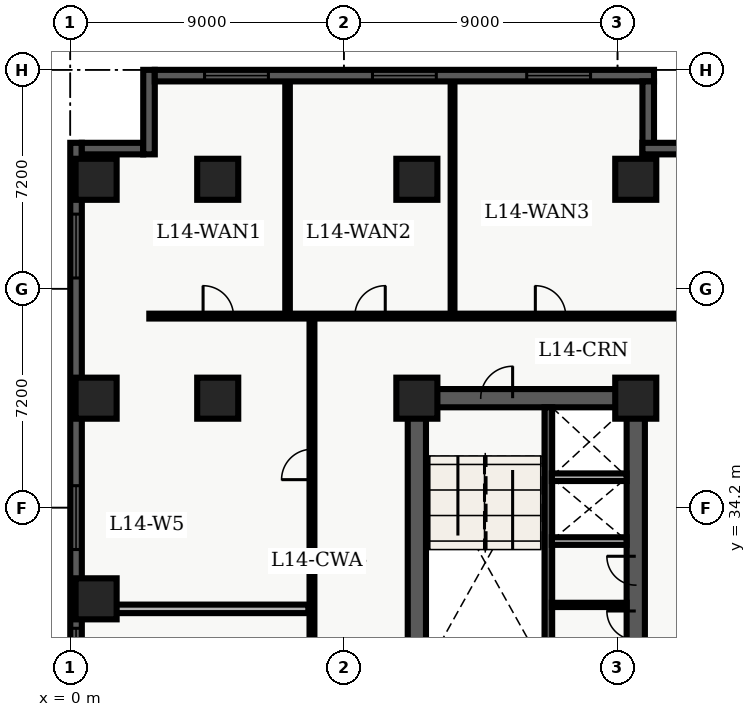
"""IFC4 building model, lengths in metres.
Left out: names, types, materials, properties, quantities, classifications, styles, units other than length and angle.
Written with IfcOpenShell. Run it as: python <this file> out.ifc"""

import sys

from ifc_helpers import new_model, entity, si_unit, converted_unit, direction, frame, origin_with_axes, origin_2d_with_axis, place, context, subcontext, project, spatial, polyline, rectangle, outline, extrude, element, fill, save


model = new_model("IFC4")
c1 = context("Model", 3, precision=1e-05, world=origin_with_axes(), true_north=direction((0.0, 1.0)))
c2 = subcontext(c1, "Body", "Model", "MODEL_VIEW")
j1 = project(units=[si_unit("LENGTHUNIT", "METRE"), converted_unit("PLANEANGLEUNIT", "DEGREE", entity("IfcPlaneAngleMeasure", 0.017), si_unit("PLANEANGLEUNIT", "RADIAN"), dimensions=[0, 0, 0, 0, 0, 0, 0])], contexts=[c1])
p1 = place(None, origin_with_axes())
s1 = spatial("IfcSite", under=j1, at=p1, CompositionType="ELEMENT")
p2 = place(p1, origin_with_axes())
s2 = spatial("IfcBuilding", under=s1, at=p2, CompositionType="ELEMENT")
p3 = place(p2, frame((0.0, 0.0, 60.0), z_axis=(0.0, 0.0, 1.0), x_axis=(1.0, 0.0, 0.0)))
s3 = spatial("IfcBuildingStorey", under=s2, at=p3, CompositionType="ELEMENT", Elevation=60.0)
p4 = place(p3, frame((11.4, 10.8, 0.0), z_axis=(0.0, 0.0, 1.0), x_axis=(0.0, 1.0, 0.0)))
e1 = element("IfcWall", 1, at=p4, inside=s3, PredefinedType="SHEAR", context=c2, shape_type="SweptSolid", body=[
    extrude(outline(polyline([(0.0, -0.3), (27.0, -0.3), (27.0, 0.3), (0.0, 0.3), (0.0, -0.3)])), origin_with_axes(), (0.0, 0.0, 1.0), 3.66),
])
p5 = place(p3, frame((11.4, 37.8, 0.0), z_axis=(0.0, 0.0, 1.0), x_axis=(1.0, 0.0, 0.0)))
e2 = element("IfcWall", 2, at=p5, inside=s3, PredefinedType="SHEAR", context=c2, shape_type="SweptSolid", body=[
    extrude(outline(polyline([(0.0, -0.3), (7.2, -0.3), (7.2, 0.3), (0.0, 0.3), (0.0, -0.3)])), origin_with_axes(), (0.0, 0.0, 1.0), 3.66),
])
p6 = place(p5, frame((2.625, 0.0, 0.0), z_axis=(0.0, 0.0, 1.0), x_axis=(1.0, 0.0, 0.0)))
e3 = element("IfcOpeningElement", 3, at=p6, cuts=e2, PredefinedType="OPENING", context=c2, shape_type="SweptSolid", body=[
    extrude(rectangle(XDim=1.05, YDim=0.62, at=origin_2d_with_axis()), origin_with_axes(), (0.0, 0.0, 1.0), 2.15),
])
p7 = place(p3, frame((18.6, 24.3, 0.0), z_axis=(0.0, 0.0, 1.0), x_axis=(0.0, 1.0, 0.0)))
e4 = element("IfcWall", 4, at=p7, inside=s3, PredefinedType="SHEAR", context=c2, shape_type="SweptSolid", body=[
    extrude(outline(polyline([(0.0, -0.3), (13.5, -0.3), (13.5, 0.3), (0.0, 0.3), (0.0, -0.3)])), origin_with_axes(), (0.0, 0.0, 1.0), 3.66),
])
p8 = place(p7, frame((6.025, 0.0, 0.0), z_axis=(0.0, 0.0, 1.0), x_axis=(1.0, 0.0, 0.0)))
e5 = element("IfcOpeningElement", 5, at=p8, cuts=e4, PredefinedType="OPENING", context=c2, shape_type="SweptSolid", body=[
    extrude(rectangle(XDim=0.95, YDim=0.62, at=origin_2d_with_axis()), origin_with_axes(), (0.0, 0.0, 1.0), 2.15),
])
p9 = place(p7, frame((7.825, 0.0, 0.0), z_axis=(0.0, 0.0, 1.0), x_axis=(1.0, 0.0, 0.0)))
e6 = element("IfcOpeningElement", 6, at=p9, cuts=e4, PredefinedType="OPENING", context=c2, shape_type="SweptSolid", body=[
    extrude(rectangle(XDim=0.95, YDim=0.62, at=origin_2d_with_axis()), origin_with_axes(), (0.0, 0.0, 1.0), 2.15),
])
p10 = place(p3, frame((15.725, 28.9, 0.0), z_axis=(0.0, 0.0, 1.0), x_axis=(0.0, 1.0, 0.0)))
e7 = element("IfcWall", 7, at=p10, inside=s3, PredefinedType="SHEAR", context=c2, shape_type="SweptSolid", body=[
    extrude(outline(polyline([(0.0, -0.125), (8.6, -0.125), (8.6, 0.125), (0.0, 0.125), (0.0, -0.125)])), origin_with_axes(), (0.0, 0.0, 1.0), 3.66),
])
for number, where, z_axis, x_axis in (
    (8, (11.4, 37.8, 0.0), (0.0, 0.0, 1.0), (1.0, 0.0, 0.0)),
    (9, (11.4, 45.0, 0.0), (0.0, 0.0, 1.0), (1.0, 0.0, 0.0)),
    (10, (18.6, 37.8, 0.0), (0.0, 0.0, 1.0), (1.0, 0.0, 0.0)),
    (11, (18.6, 45.0, 0.0), (0.0, 0.0, 1.0), (1.0, 0.0, 0.0)),
    (12, (4.85, 37.8, 0.0), (0.0, 0.0, 1.0), (1.0, 0.0, 0.0)),
    (13, (4.85, 45.0, 0.0), (0.0, 0.0, 1.0), (1.0, 0.0, 0.0)),
    (14, (0.85, 31.2, 0.0), (0.0, 0.0, 1.0), (1.0, 0.0, 0.0)),
    (15, (0.85, 37.8, 0.0), (0.0, 0.0, 1.0), (1.0, 0.0, 0.0)),
    (16, (0.85, 45.0, 0.0), (0.0, 0.0, 1.0), (1.0, 0.0, 0.0)),
):
    element("IfcColumn", number, at=place(p3, frame(where, z_axis=z_axis, x_axis=x_axis)), inside=s3, PredefinedType="COLUMN", context=c2, shape_type="SweptSolid", body=[
        extrude(rectangle(XDim=1.35, YDim=1.35, at=origin_2d_with_axis()), origin_with_axes(), (0.0, 0.0, 1.0), 3.9),
    ])
for number, where, z_axis, x_axis in (
    (17, (15.84, 33.1, 0.0), (0.0, 0.0, 1.0), (1.0, 0.0, 0.0)),
    (18, (15.84, 35.2, 0.0), (0.0, 0.0, 1.0), (1.0, 0.0, 0.0)),
):
    element("IfcWall", number, at=place(p3, frame(where, z_axis=z_axis, x_axis=x_axis)), inside=s3, PredefinedType="SOLIDWALL", context=c2, shape_type="SweptSolid", body=[
        extrude(outline(polyline([(0.0, -0.125), (2.46, -0.125), (2.46, 0.125), (0.0, 0.125), (0.0, -0.125)])), origin_with_axes(), (0.0, 0.0, 1.0), 2.7),
    ])
p11 = place(p3, frame((15.84, 31.0, 0.0), z_axis=(0.0, 0.0, 1.0), x_axis=(1.0, 0.0, 0.0)))
e19 = element("IfcWall", 19, at=p11, inside=s3, PredefinedType="PARTITIONING", context=c2, shape_type="SweptSolid", body=[
    extrude(outline(polyline([(0.0, -0.07), (2.46, -0.07), (2.46, 0.07), (0.0, 0.07), (0.0, -0.07)])), origin_with_axes(), (0.0, 0.0, 1.0), 2.7),
])
p12 = place(p3, frame((2.6, 40.5, 0.0), z_axis=(0.0, 0.0, 1.0), x_axis=(1.0, 0.0, 0.0)))
e20 = element("IfcWall", 20, at=p12, inside=s3, PredefinedType="PARTITIONING", context=c2, shape_type="SweptSolid", body=[
    extrude(outline(polyline([(0.0, -0.08), (18.65, -0.08), (18.65, 0.08), (0.0, 0.08), (0.0, -0.08)])), origin_with_axes(), (0.0, 0.0, 1.0), 2.7),
])
p13 = place(p12, frame((2.268, 0.0, 0.0), z_axis=(0.0, 0.0, 1.0), x_axis=(1.0, 0.0, 0.0)))
e21 = element("IfcOpeningElement", 21, at=p13, cuts=e20, PredefinedType="OPENING", context=c2, shape_type="SweptSolid", body=[
    extrude(rectangle(XDim=1.0, YDim=0.18, at=origin_2d_with_axis()), origin_with_axes(), (0.0, 0.0, 1.0), 2.15),
])
p14 = place(p12, frame((7.261, 0.0, 0.0), z_axis=(0.0, 0.0, 1.0), x_axis=(1.0, 0.0, 0.0)))
e22 = element("IfcOpeningElement", 22, at=p14, cuts=e20, PredefinedType="OPENING", context=c2, shape_type="SweptSolid", body=[
    extrude(rectangle(XDim=1.0, YDim=0.18, at=origin_2d_with_axis()), origin_with_axes(), (0.0, 0.0, 1.0), 2.15),
])
p15 = place(p12, frame((13.197, 0.0, 0.0), z_axis=(0.0, 0.0, 1.0), x_axis=(1.0, 0.0, 0.0)))
e23 = element("IfcOpeningElement", 23, at=p15, cuts=e20, PredefinedType="OPENING", context=c2, shape_type="SweptSolid", body=[
    extrude(rectangle(XDim=1.0, YDim=0.18, at=origin_2d_with_axis()), origin_with_axes(), (0.0, 0.0, 1.0), 2.15),
])
p16 = place(p3, frame((7.95, 7.8, 0.0), z_axis=(0.0, 0.0, 1.0), x_axis=(0.0, 1.0, 0.0)))
e24 = element("IfcWall", 24, at=p16, inside=s3, PredefinedType="PARTITIONING", context=c2, shape_type="SweptSolid", body=[
    extrude(outline(polyline([(0.0, -0.08), (32.7, -0.08), (32.7, 0.08), (0.0, 0.08), (0.0, -0.08)])), origin_with_axes(), (0.0, 0.0, 1.0), 2.7),
])
p17 = place(p16, frame((2.288, 0.0, 0.0), z_axis=(0.0, 0.0, 1.0), x_axis=(1.0, 0.0, 0.0)))
e25 = element("IfcOpeningElement", 25, at=p17, cuts=e24, PredefinedType="OPENING", context=c2, shape_type="SweptSolid", body=[
    extrude(rectangle(XDim=1.0, YDim=0.18, at=origin_2d_with_axis()), origin_with_axes(), (0.0, 0.0, 1.0), 2.15),
])
p18 = place(p16, frame((6.971, 0.0, 0.0), z_axis=(0.0, 0.0, 1.0), x_axis=(1.0, 0.0, 0.0)))
e26 = element("IfcOpeningElement", 26, at=p18, cuts=e24, PredefinedType="OPENING", context=c2, shape_type="SweptSolid", body=[
    extrude(rectangle(XDim=1.0, YDim=0.18, at=origin_2d_with_axis()), origin_with_axes(), (0.0, 0.0, 1.0), 2.15),
])
p19 = place(p16, frame((12.598, 0.0, 0.0), z_axis=(0.0, 0.0, 1.0), x_axis=(1.0, 0.0, 0.0)))
e27 = element("IfcOpeningElement", 27, at=p19, cuts=e24, PredefinedType="OPENING", context=c2, shape_type="SweptSolid", body=[
    extrude(rectangle(XDim=1.0, YDim=0.18, at=origin_2d_with_axis()), origin_with_axes(), (0.0, 0.0, 1.0), 2.15),
])
p20 = place(p16, frame((19.386, 0.0, 0.0), z_axis=(0.0, 0.0, 1.0), x_axis=(1.0, 0.0, 0.0)))
e28 = element("IfcOpeningElement", 28, at=p20, cuts=e24, PredefinedType="OPENING", context=c2, shape_type="SweptSolid", body=[
    extrude(rectangle(XDim=1.0, YDim=0.18, at=origin_2d_with_axis()), origin_with_axes(), (0.0, 0.0, 1.0), 2.15),
])
p21 = place(p16, frame((27.82, 0.0, 0.0), z_axis=(0.0, 0.0, 1.0), x_axis=(1.0, 0.0, 0.0)))
e29 = element("IfcOpeningElement", 29, at=p21, cuts=e24, PredefinedType="OPENING", context=c2, shape_type="SweptSolid", body=[
    extrude(rectangle(XDim=1.0, YDim=0.18, at=origin_2d_with_axis()), origin_with_axes(), (0.0, 0.0, 1.0), 2.15),
])
p22 = place(p3, frame((0.375, 30.87, 0.0), z_axis=(0.0, 0.0, 1.0), x_axis=(1.0, 0.0, 0.0)))
e30 = element("IfcWall", 30, at=p22, inside=s3, PredefinedType="PARTITIONING", context=c2, shape_type="SweptSolid", body=[
    extrude(outline(polyline([(0.0, -0.14), (7.455, -0.14), (7.455, 0.14), (0.0, 0.14), (0.0, -0.14)])), origin_with_axes(), (0.0, 0.0, 1.0), 2.7),
])
p23 = place(p3, frame((7.147, 40.6, 0.0), z_axis=(0.0, 0.0, 1.0), x_axis=(0.0, 1.0, 0.0)))
e31 = element("IfcWall", 31, at=p23, inside=s3, PredefinedType="PARTITIONING", context=c2, shape_type="SweptSolid", body=[
    extrude(outline(polyline([(0.0, -0.075), (7.64, -0.075), (7.64, 0.075), (0.0, 0.075), (0.0, -0.075)])), origin_with_axes(), (0.0, 0.0, 1.0), 2.7),
])
p24 = place(p3, frame((12.574, 40.6, 0.0), z_axis=(0.0, 0.0, 1.0), x_axis=(0.0, 1.0, 0.0)))
e32 = element("IfcWall", 32, at=p24, inside=s3, PredefinedType="PARTITIONING", context=c2, shape_type="SweptSolid", body=[
    extrude(outline(polyline([(0.0, -0.062), (7.64, -0.062), (7.64, 0.062), (0.0, 0.062), (0.0, -0.062)])), origin_with_axes(), (0.0, 0.0, 1.0), 2.7),
])
p25 = place(p3, frame((0.19, 2.78, 0.0), z_axis=(0.0, 0.0, 1.0), x_axis=(0.0, 1.0, 0.0)))
e33 = element("IfcWall", 33, at=p25, inside=s3, PredefinedType="SOLIDWALL", context=c2, shape_type="SweptSolid", body=[
    extrude(outline(polyline([(0.0, -0.19), (43.42, -0.19), (43.42, 0.19), (0.0, 0.19), (0.0, -0.19)])), origin_with_axes(), (0.0, 0.0, 1.0), 3.66),
])
p26 = place(p25, frame((2.946, 0.0, 0.45), z_axis=(0.0, 0.0, 1.0), x_axis=(1.0, 0.0, 0.0)))
e34 = element("IfcOpeningElement", 34, at=p26, cuts=e33, PredefinedType="OPENING", context=c2, shape_type="SweptSolid", body=[
    extrude(rectangle(XDim=2.1, YDim=0.4, at=origin_2d_with_axis()), origin_with_axes(), (0.0, 0.0, 1.0), 2.2),
])
p27 = place(p25, frame((12.328, 0.0, 0.45), z_axis=(0.0, 0.0, 1.0), x_axis=(1.0, 0.0, 0.0)))
e35 = element("IfcOpeningElement", 35, at=p27, cuts=e33, PredefinedType="OPENING", context=c2, shape_type="SweptSolid", body=[
    extrude(rectangle(XDim=2.1, YDim=0.4, at=origin_2d_with_axis()), origin_with_axes(), (0.0, 0.0, 1.0), 2.2),
])
p28 = place(p25, frame((17.469, 0.0, 0.45), z_axis=(0.0, 0.0, 1.0), x_axis=(1.0, 0.0, 0.0)))
e36 = element("IfcOpeningElement", 36, at=p28, cuts=e33, PredefinedType="OPENING", context=c2, shape_type="SweptSolid", body=[
    extrude(rectangle(XDim=2.1, YDim=0.4, at=origin_2d_with_axis()), origin_with_axes(), (0.0, 0.0, 1.0), 2.2),
])
p29 = place(p25, frame((22.56, 0.0, 0.45), z_axis=(0.0, 0.0, 1.0), x_axis=(1.0, 0.0, 0.0)))
e37 = element("IfcOpeningElement", 37, at=p29, cuts=e33, PredefinedType="OPENING", context=c2, shape_type="SweptSolid", body=[
    extrude(rectangle(XDim=2.1, YDim=0.4, at=origin_2d_with_axis()), origin_with_axes(), (0.0, 0.0, 1.0), 2.2),
])
p30 = place(p25, frame((26.401, 0.0, 0.45), z_axis=(0.0, 0.0, 1.0), x_axis=(1.0, 0.0, 0.0)))
e38 = element("IfcOpeningElement", 38, at=p30, cuts=e33, PredefinedType="OPENING", context=c2, shape_type="SweptSolid", body=[
    extrude(rectangle(XDim=2.1, YDim=0.4, at=origin_2d_with_axis()), origin_with_axes(), (0.0, 0.0, 1.0), 2.2),
])
p31 = place(p25, frame((31.092, 0.0, 0.45), z_axis=(0.0, 0.0, 1.0), x_axis=(1.0, 0.0, 0.0)))
e39 = element("IfcOpeningElement", 39, at=p31, cuts=e33, PredefinedType="OPENING", context=c2, shape_type="SweptSolid", body=[
    extrude(rectangle(XDim=2.1, YDim=0.4, at=origin_2d_with_axis()), origin_with_axes(), (0.0, 0.0, 1.0), 2.2),
])
p32 = place(p25, frame((40.024, 0.0, 0.45), z_axis=(0.0, 0.0, 1.0), x_axis=(1.0, 0.0, 0.0)))
e40 = element("IfcOpeningElement", 40, at=p32, cuts=e33, PredefinedType="OPENING", context=c2, shape_type="SweptSolid", body=[
    extrude(rectangle(XDim=2.1, YDim=0.4, at=origin_2d_with_axis()), origin_with_axes(), (0.0, 0.0, 1.0), 2.2),
])
p33 = place(p3, frame((0.38, 46.01, 0.0), z_axis=(0.0, 0.0, 1.0), x_axis=(1.0, 0.0, 0.0)))
e41 = element("IfcWall", 41, at=p33, inside=s3, PredefinedType="SOLIDWALL", context=c2, shape_type="SweptSolid", body=[
    extrude(outline(polyline([(0.0, -0.19), (2.02, -0.19), (2.02, 0.19), (0.0, 0.19), (0.0, -0.19)])), origin_with_axes(), (0.0, 0.0, 1.0), 3.66),
])
p34 = place(p3, frame((2.59, 45.82, 0.0), z_axis=(0.0, 0.0, 1.0), x_axis=(0.0, 1.0, 0.0)))
e42 = element("IfcWall", 42, at=p34, inside=s3, PredefinedType="SOLIDWALL", context=c2, shape_type="SweptSolid", body=[
    extrude(outline(polyline([(0.0, -0.19), (2.78, -0.19), (2.78, 0.19), (0.0, 0.19), (0.0, -0.19)])), origin_with_axes(), (0.0, 0.0, 1.0), 3.66),
])
p35 = place(p3, frame((2.78, 48.41, 0.0), z_axis=(0.0, 0.0, 1.0), x_axis=(1.0, 0.0, 0.0)))
e43 = element("IfcWall", 43, at=p35, inside=s3, PredefinedType="SOLIDWALL", context=c2, shape_type="SweptSolid", body=[
    extrude(outline(polyline([(0.0, -0.19), (16.42, -0.19), (16.42, 0.19), (0.0, 0.19), (0.0, -0.19)])), origin_with_axes(), (0.0, 0.0, 1.0), 3.66),
])
p36 = place(p35, frame((2.687, 0.0, 0.45), z_axis=(0.0, 0.0, 1.0), x_axis=(1.0, 0.0, 0.0)))
e44 = element("IfcOpeningElement", 44, at=p36, cuts=e43, PredefinedType="OPENING", context=c2, shape_type="SweptSolid", body=[
    extrude(rectangle(XDim=2.1, YDim=0.4, at=origin_2d_with_axis()), origin_with_axes(), (0.0, 0.0, 1.0), 2.2),
])
p37 = place(p35, frame((8.21, 0.0, 0.45), z_axis=(0.0, 0.0, 1.0), x_axis=(1.0, 0.0, 0.0)))
e45 = element("IfcOpeningElement", 45, at=p37, cuts=e43, PredefinedType="OPENING", context=c2, shape_type="SweptSolid", body=[
    extrude(rectangle(XDim=2.1, YDim=0.4, at=origin_2d_with_axis()), origin_with_axes(), (0.0, 0.0, 1.0), 2.2),
])
p38 = place(p35, frame((13.283, 0.0, 0.45), z_axis=(0.0, 0.0, 1.0), x_axis=(1.0, 0.0, 0.0)))
e46 = element("IfcOpeningElement", 46, at=p38, cuts=e43, PredefinedType="OPENING", context=c2, shape_type="SweptSolid", body=[
    extrude(rectangle(XDim=2.1, YDim=0.4, at=origin_2d_with_axis()), origin_with_axes(), (0.0, 0.0, 1.0), 2.2),
])
p39 = place(p3, frame((19.01, 48.22, 0.0), z_axis=(0.0, 0.0, 1.0), x_axis=(0.0, -1.0, 0.0)))
e47 = element("IfcWall", 47, at=p39, inside=s3, PredefinedType="SOLIDWALL", context=c2, shape_type="SweptSolid", body=[
    extrude(outline(polyline([(0.0, -0.19), (2.56, -0.19), (2.56, 0.19), (0.0, 0.19), (0.0, -0.19)])), origin_with_axes(), (0.0, 0.0, 1.0), 3.66),
])
p40 = place(p3, frame((18.82, 46.01, 0.0), z_axis=(0.0, 0.0, 1.0), x_axis=(1.0, 0.0, 0.0)))
e48 = element("IfcWall", 48, at=p40, inside=s3, PredefinedType="SOLIDWALL", context=c2, shape_type="SweptSolid", body=[
    extrude(outline(polyline([(0.0, -0.19), (2.78, -0.19), (2.78, 0.19), (0.0, 0.19), (0.0, -0.19)])), origin_with_axes(), (0.0, 0.0, 1.0), 3.66),
])
p41 = place(p5, frame((2.625, 0.0, 0.0), z_axis=(0.0, 0.0, 1.0), x_axis=(1.0, 0.0, 0.0)))
e49 = element("IfcDoor", 49, at=p41, inside=s3, OperationType="SINGLE_SWING_RIGHT", PredefinedType="DOOR", context=c2, shape_type="SweptSolid", body=[
    extrude(rectangle(XDim=1.05, YDim=0.09, at=origin_2d_with_axis()), origin_with_axes(), (0.0, 0.0, 1.0), 2.15),
])
fill(e3, e49)
p42 = place(p7, frame((6.025, 0.0, 0.0), z_axis=(0.0, 0.0, 1.0), x_axis=(1.0, 0.0, 0.0)))
e50 = element("IfcDoor", 50, at=p42, inside=s3, OperationType="SINGLE_SWING_RIGHT", PredefinedType="DOOR", context=c2, shape_type="SweptSolid", body=[
    extrude(rectangle(XDim=0.95, YDim=0.09, at=origin_2d_with_axis()), origin_with_axes(), (0.0, 0.0, 1.0), 2.15),
])
fill(e5, e50)
p43 = place(p7, frame((7.825, 0.0, 0.0), z_axis=(0.0, 0.0, 1.0), x_axis=(1.0, 0.0, 0.0)))
e51 = element("IfcDoor", 51, at=p43, inside=s3, OperationType="SINGLE_SWING_RIGHT", PredefinedType="DOOR", context=c2, shape_type="SweptSolid", body=[
    extrude(rectangle(XDim=0.95, YDim=0.09, at=origin_2d_with_axis()), origin_with_axes(), (0.0, 0.0, 1.0), 2.15),
])
fill(e6, e51)
p44 = place(p16, frame((27.82, 0.0, 0.0), z_axis=(0.0, 0.0, 1.0), x_axis=(1.0, 0.0, 0.0)))
e52 = element("IfcDoor", 52, at=p44, inside=s3, OperationType="SINGLE_SWING_LEFT", PredefinedType="DOOR", context=c2, shape_type="SweptSolid", body=[
    extrude(rectangle(XDim=1.0, YDim=0.09, at=origin_2d_with_axis()), origin_with_axes(), (0.0, 0.0, 1.0), 2.15),
])
fill(e29, e52)
p45 = place(p12, frame((2.268, 0.0, 0.0), z_axis=(0.0, 0.0, 1.0), x_axis=(1.0, 0.0, 0.0)))
e53 = element("IfcDoor", 53, at=p45, inside=s3, OperationType="SINGLE_SWING_LEFT", PredefinedType="DOOR", context=c2, shape_type="SweptSolid", body=[
    extrude(rectangle(XDim=1.0, YDim=0.09, at=origin_2d_with_axis()), origin_with_axes(), (0.0, 0.0, 1.0), 2.15),
])
fill(e21, e53)
p46 = place(p12, frame((7.261, 0.0, 0.0), z_axis=(0.0, 0.0, 1.0), x_axis=(1.0, 0.0, 0.0)))
e54 = element("IfcDoor", 54, at=p46, inside=s3, OperationType="SINGLE_SWING_RIGHT", PredefinedType="DOOR", context=c2, shape_type="SweptSolid", body=[
    extrude(rectangle(XDim=1.0, YDim=0.09, at=origin_2d_with_axis()), origin_with_axes(), (0.0, 0.0, 1.0), 2.15),
])
fill(e22, e54)
p47 = place(p12, frame((13.197, 0.0, 0.0), z_axis=(0.0, 0.0, 1.0), x_axis=(1.0, 0.0, 0.0)))
e55 = element("IfcDoor", 55, at=p47, inside=s3, OperationType="SINGLE_SWING_LEFT", PredefinedType="DOOR", context=c2, shape_type="SweptSolid", body=[
    extrude(rectangle(XDim=1.0, YDim=0.09, at=origin_2d_with_axis()), origin_with_axes(), (0.0, 0.0, 1.0), 2.15),
])
fill(e23, e55)
p48 = place(p25, frame((26.401, 0.0, 0.45), z_axis=(0.0, 0.0, 1.0), x_axis=(1.0, 0.0, 0.0)))
e56 = element("IfcWindow", 56, at=p48, inside=s3, PredefinedType="WINDOW", context=c2, shape_type="SweptSolid", body=[
    extrude(rectangle(XDim=2.1, YDim=0.09, at=origin_2d_with_axis()), origin_with_axes(), (0.0, 0.0, 1.0), 2.2),
])
fill(e38, e56)
p49 = place(p25, frame((31.092, 0.0, 0.45), z_axis=(0.0, 0.0, 1.0), x_axis=(1.0, 0.0, 0.0)))
e57 = element("IfcWindow", 57, at=p49, inside=s3, PredefinedType="WINDOW", context=c2, shape_type="SweptSolid", body=[
    extrude(rectangle(XDim=2.1, YDim=0.09, at=origin_2d_with_axis()), origin_with_axes(), (0.0, 0.0, 1.0), 2.2),
])
fill(e39, e57)
p50 = place(p25, frame((40.024, 0.0, 0.45), z_axis=(0.0, 0.0, 1.0), x_axis=(1.0, 0.0, 0.0)))
e58 = element("IfcWindow", 58, at=p50, inside=s3, PredefinedType="WINDOW", context=c2, shape_type="SweptSolid", body=[
    extrude(rectangle(XDim=2.1, YDim=0.09, at=origin_2d_with_axis()), origin_with_axes(), (0.0, 0.0, 1.0), 2.2),
])
fill(e40, e58)
p51 = place(p35, frame((2.687, 0.0, 0.45), z_axis=(0.0, 0.0, 1.0), x_axis=(1.0, 0.0, 0.0)))
e59 = element("IfcWindow", 59, at=p51, inside=s3, PredefinedType="WINDOW", context=c2, shape_type="SweptSolid", body=[
    extrude(rectangle(XDim=2.1, YDim=0.09, at=origin_2d_with_axis()), origin_with_axes(), (0.0, 0.0, 1.0), 2.2),
])
fill(e44, e59)
p52 = place(p35, frame((8.21, 0.0, 0.45), z_axis=(0.0, 0.0, 1.0), x_axis=(1.0, 0.0, 0.0)))
e60 = element("IfcWindow", 60, at=p52, inside=s3, PredefinedType="WINDOW", context=c2, shape_type="SweptSolid", body=[
    extrude(rectangle(XDim=2.1, YDim=0.09, at=origin_2d_with_axis()), origin_with_axes(), (0.0, 0.0, 1.0), 2.2),
])
fill(e45, e60)
p53 = place(p35, frame((13.283, 0.0, 0.45), z_axis=(0.0, 0.0, 1.0), x_axis=(1.0, 0.0, 0.0)))
e61 = element("IfcWindow", 61, at=p53, inside=s3, PredefinedType="WINDOW", context=c2, shape_type="SweptSolid", body=[
    extrude(rectangle(XDim=2.1, YDim=0.09, at=origin_2d_with_axis()), origin_with_axes(), (0.0, 0.0, 1.0), 2.2),
])
fill(e46, e61)
save(model, sys.argv[1])
